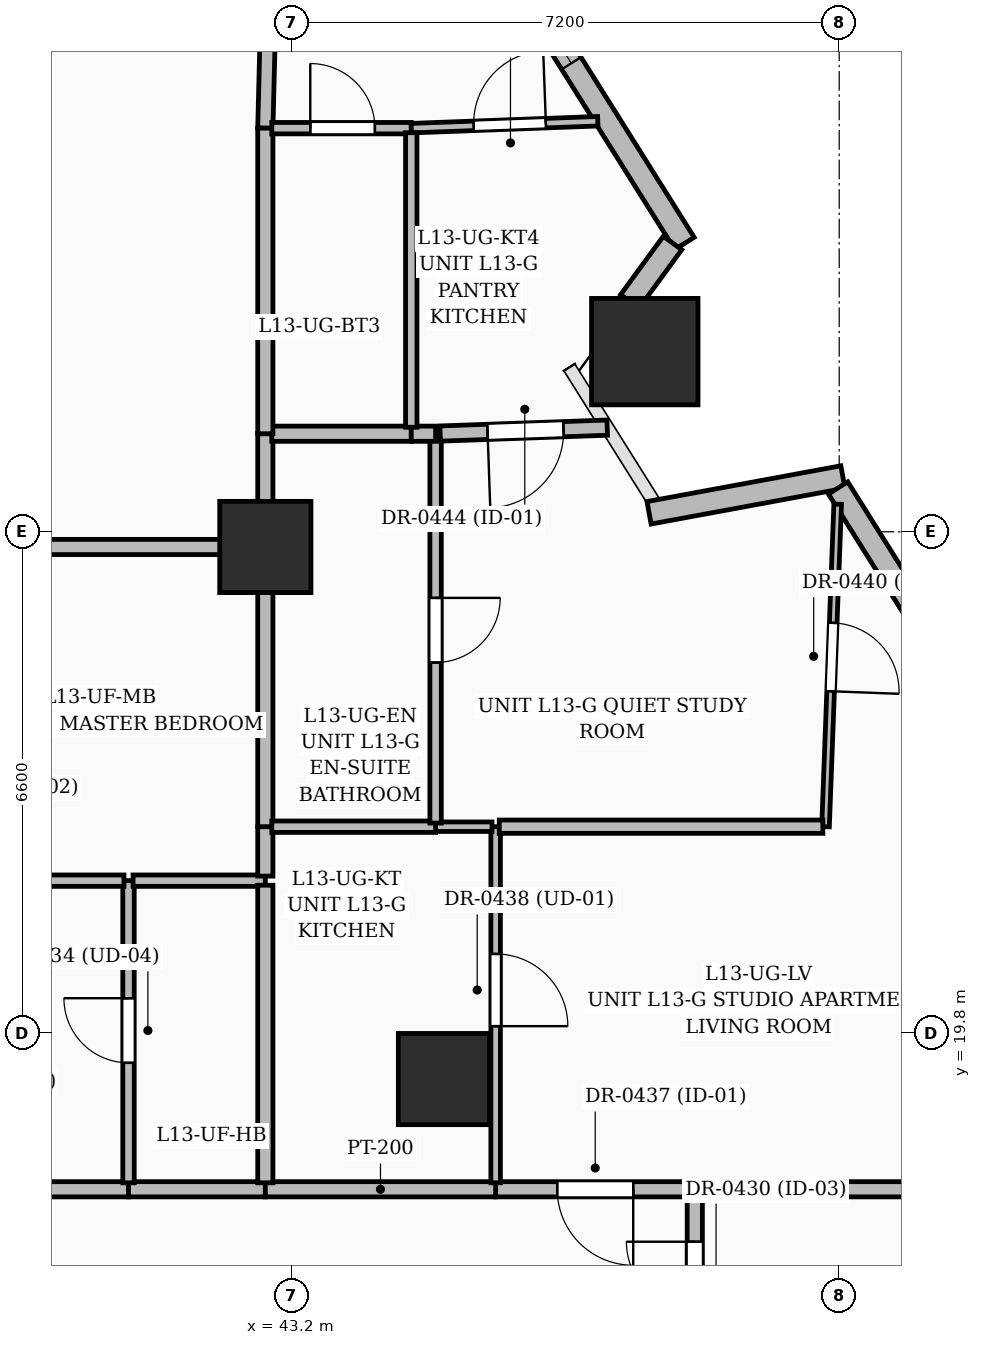
"""IFC4 building model, lengths in metres.
Left out: names, types, materials, properties, quantities, classifications, styles, units other than length and angle.
Written with IfcOpenShell. Run it as: python <this file> out.ifc"""

import sys

from ifc_helpers import new_model, si_unit, direction, frame, frame_2d, origin, origin_2d, place, context, subcontext, project, spatial, rectangle, extrude, element, fill, save


model = new_model("IFC4")
c1 = context("Model", 3, precision=1e-05, world=origin(), true_north=direction((0.0, 1.0)))
c2 = subcontext(c1, "Body", "Model", "MODEL_VIEW")
j1 = project(units=[si_unit("LENGTHUNIT", "METRE"), si_unit("PLANEANGLEUNIT", "RADIAN")], contexts=[c1])
p1 = place(None, origin())
s1 = spatial("IfcSite", under=j1, at=p1, CompositionType="ELEMENT")
p2 = place(p1, origin())
s2 = spatial("IfcBuilding", under=s1, at=p2, CompositionType="ELEMENT")
p3 = place(p2, frame((0.0, 0.0, 57.0)))
s3 = spatial("IfcBuildingStorey", under=s2, at=p3, CompositionType="ELEMENT", Elevation=57.0)
for number, where, z_axis, x_axis in (
    (1, (45.2, 19.2, 0.0), (0.0, 0.0, 1.0), (1.0, 0.0, 0.0)),
    (2, (42.85, 26.2, 0.0), (0.0, 0.0, 1.0), (1.0, 0.0, 0.0)),
):
    element("IfcColumn", number, at=place(p3, frame(where, z_axis=z_axis, x_axis=x_axis)), inside=s3, PredefinedType="COLUMN", context=c2, shape_type="SweptSolid", body=[
        extrude(rectangle(XDim=1.2, YDim=1.2, at=origin_2d()), origin(), (0.0, 0.0, 1.0), 3.6),
    ])
p4 = place(p3, frame((47.842, 28.77, 0.0), z_axis=(0.0, 0.0, 1.0), x_axis=(1.0, 0.0, 0.0)))
e3 = element("IfcColumn", 3, at=p4, inside=s3, PredefinedType="COLUMN", context=c2, shape_type="SweptSolid", body=[
    extrude(rectangle(XDim=1.4, YDim=1.4, at=origin_2d()), origin(), (0.0, 0.0, 1.0), 3.6),
])
p5 = place(p3, frame((45.24, 35.167, 0.0), z_axis=(0.0, 0.0, 1.0), x_axis=(0.53188806159, -0.846814672723, 0.0)))
e4 = element("IfcWall", 4, at=p5, inside=s3, PredefinedType="SOLIDWALL", context=c2, shape_type="SweptSolid", body=[
    extrude(rectangle(XDim=5.874, YDim=0.3, at=frame_2d((2.937, 0.0))), origin(), (0.0, 0.0, 1.0), 3.35),
])
p6 = place(p5, frame((0.975, 0.0, 0.55)))
e5 = element("IfcOpeningElement", 5, at=p6, cuts=e4, PredefinedType="OPENING", context=c2, shape_type="SweptSolid", body=[
    extrude(rectangle(XDim=2.1, YDim=2.4, at=frame_2d((1.05, 1.2))), frame((0.0, 0.16, 0.0), z_axis=(0.0, -1.0, 0.0), x_axis=(1.0, 0.0, 0.0)), (0.0, 0.0, 1.0), 0.32),
])
p7 = place(p3, frame((48.208, 30.199, 0.0), z_axis=(0.0, 0.0, 1.0), x_axis=(-0.590673165439, -0.806910906873, 0.0)))
e6 = element("IfcWall", 6, at=p7, inside=s3, PredefinedType="SOLIDWALL", context=c2, shape_type="SweptSolid", body=[
    extrude(rectangle(XDim=0.951, YDim=0.3, at=frame_2d((0.475, 0.0))), origin(), (0.0, 0.0, 1.0), 2.375),
])
p8 = place(p3, frame((47.898, 26.65, 0.0), z_axis=(0.0, 0.0, 1.0), x_axis=(0.983393554406, 0.181485859375, 0.0)))
e7 = element("IfcWall", 7, at=p8, inside=s3, PredefinedType="SOLIDWALL", context=c2, shape_type="SweptSolid", body=[
    extrude(rectangle(XDim=2.594, YDim=0.3, at=frame_2d((1.297, 0.0))), origin(), (0.0, 0.0, 1.0), 2.375),
])
p9 = place(p3, frame((50.385, 26.977, 0.0), z_axis=(0.0, 0.0, 1.0), x_axis=(0.531889110823, -0.846814013694, 0.0)))
e8 = element("IfcWall", 8, at=p9, inside=s3, PredefinedType="SOLIDWALL", context=c2, shape_type="SweptSolid", body=[
    extrude(rectangle(XDim=6.126, YDim=0.3, at=frame_2d((3.063, 0.0))), origin(), (0.0, 0.0, 1.0), 3.35),
])
p10 = place(p9, frame((2.37, 0.0, 0.6)))
e9 = element("IfcOpeningElement", 9, at=p10, cuts=e8, PredefinedType="OPENING", context=c2, shape_type="SweptSolid", body=[
    extrude(rectangle(XDim=1.5, YDim=2.1, at=frame_2d((0.75, 1.05))), frame((0.0, 0.16, 0.0), z_axis=(0.0, -1.0, 0.0), x_axis=(1.0, 0.0, 0.0)), (0.0, 0.0, 1.0), 0.32),
])
p11 = place(p3, frame((48.5, 15.47, 0.0), z_axis=(0.0, 0.0, 1.0), x_axis=(0.0, 1.0, 0.0)))
e10 = element("IfcWall", 10, at=p11, inside=s3, PredefinedType="PARTITIONING", context=c2, shape_type="SweptSolid", body=[
    extrude(rectangle(XDim=2.28, YDim=0.2, at=frame_2d((1.14, 0.0))), origin(), (0.0, 0.0, 1.0), 2.279),
])
p12 = place(p11, frame((0.69, 0.0, 0.0)))
e11 = element("IfcOpeningElement", 11, at=p12, cuts=e10, PredefinedType="OPENING", context=c2, shape_type="SweptSolid", body=[
    extrude(rectangle(XDim=0.9, YDim=2.1, at=frame_2d((0.45, 1.05))), frame((0.0, 0.11, 0.0), z_axis=(0.0, -1.0, 0.0), x_axis=(1.0, 0.0, 0.0)), (0.0, 0.0, 1.0), 0.22),
])
p13 = place(p3, frame((41.05, 17.75, 0.0), z_axis=(0.0, 0.0, 1.0), x_axis=(-1.0, 0.0, 0.0)))
e12 = element("IfcWall", 12, at=p13, inside=s3, PredefinedType="PARTITIONING", context=c2, shape_type="SweptSolid", body=[
    extrude(rectangle(XDim=5.48, YDim=0.2, at=frame_2d((2.74, 0.0))), origin(), (0.0, 0.0, 1.0), 3.35),
])
p14 = place(p13, frame((2.18, 0.0, 0.0)))
e13 = element("IfcOpeningElement", 13, at=p14, cuts=e12, PredefinedType="OPENING", context=c2, shape_type="SweptSolid", body=[
    extrude(rectangle(XDim=1.0, YDim=2.2, at=frame_2d((0.5, 1.1))), frame((0.0, 0.11, 0.0), z_axis=(0.0, -1.0, 0.0), x_axis=(1.0, 0.0, 0.0)), (0.0, 0.0, 1.0), 0.22),
])
p15 = place(p3, frame((42.85, 17.75, 0.0), z_axis=(0.0, 0.0, 1.0), x_axis=(-1.0, 0.0, 0.0)))
e14 = element("IfcWall", 14, at=p15, inside=s3, PredefinedType="PARTITIONING", context=c2, shape_type="SweptSolid", body=[
    extrude(rectangle(XDim=1.8, YDim=0.2, at=frame_2d((0.9, 0.0))), origin(), (0.0, 0.0, 1.0), 3.35),
])
p16 = place(p3, frame((48.415, 17.75, 0.0), z_axis=(0.0, 0.0, 1.0), x_axis=(-1.0, 0.0, 0.0)))
e15 = element("IfcWall", 15, at=p16, inside=s3, PredefinedType="PARTITIONING", context=c2, shape_type="SweptSolid", body=[
    extrude(rectangle(XDim=2.535, YDim=0.2, at=frame_2d((1.268, 0.0))), origin(), (0.0, 0.0, 1.0), 2.309),
])
p17 = place(p16, frame((0.725, 0.0, 0.0)))
e16 = element("IfcOpeningElement", 16, at=p17, cuts=e15, PredefinedType="OPENING", context=c2, shape_type="SweptSolid", body=[
    extrude(rectangle(XDim=1.0, YDim=2.2, at=frame_2d((0.5, 1.1))), frame((0.0, 0.11, 0.0), z_axis=(0.0, -1.0, 0.0), x_axis=(1.0, 0.0, 0.0)), (0.0, 0.0, 1.0), 0.22),
])
p18 = place(p3, frame((45.88, 17.75, 0.0), z_axis=(0.0, 0.0, 1.0), x_axis=(-1.0, 0.0, 0.0)))
e17 = element("IfcWall", 17, at=p18, inside=s3, PredefinedType="PARTITIONING", context=c2, shape_type="SweptSolid", body=[
    extrude(rectangle(XDim=3.03, YDim=0.2, at=frame_2d((1.515, 0.0))), origin(), (0.0, 0.0, 1.0), 2.309),
])
p19 = place(p3, frame((53.51, 17.75, 0.0), z_axis=(0.0, 0.0, 1.0), x_axis=(-1.0, 0.0, 0.0)))
e18 = element("IfcWall", 18, at=p19, inside=s3, PredefinedType="PARTITIONING", context=c2, shape_type="SweptSolid", body=[
    extrude(rectangle(XDim=4.925, YDim=0.2, at=frame_2d((2.462, 0.0))), origin(), (0.0, 0.0, 1.0), 2.279),
])
p20 = place(p3, frame((41.05, 17.835, 0.0), z_axis=(0.0, 0.0, 1.0), x_axis=(0.0, 1.0, 0.0)))
e19 = element("IfcWall", 19, at=p20, inside=s3, PredefinedType="PARTITIONING", context=c2, shape_type="SweptSolid", body=[
    extrude(rectangle(XDim=3.975, YDim=0.15, at=frame_2d((1.988, 0.0))), origin(), (0.0, 0.0, 1.0), 2.853),
])
p21 = place(p20, frame((1.579, 0.0, 0.0)))
e20 = element("IfcOpeningElement", 20, at=p21, cuts=e19, PredefinedType="OPENING", context=c2, shape_type="SweptSolid", body=[
    extrude(rectangle(XDim=0.85, YDim=2.1, at=frame_2d((0.425, 1.05))), frame((0.0, 0.085, 0.0), z_axis=(0.0, -1.0, 0.0), x_axis=(1.0, 0.0, 0.0)), (0.0, 0.0, 1.0), 0.17),
])
p22 = place(p3, frame((40.99, 21.81, 0.0), z_axis=(0.0, 0.0, 1.0), x_axis=(-1.0, 0.0, 0.0)))
e21 = element("IfcWall", 21, at=p22, inside=s3, PredefinedType="PARTITIONING", context=c2, shape_type="SweptSolid", body=[
    extrude(rectangle(XDim=5.373, YDim=0.15, at=frame_2d((2.686, 0.0))), origin(), (0.0, 0.0, 1.0), 3.35),
])
p23 = place(p22, frame((2.23, 0.0, 0.0)))
e22 = element("IfcOpeningElement", 22, at=p23, cuts=e21, PredefinedType="OPENING", context=c2, shape_type="SweptSolid", body=[
    extrude(rectangle(XDim=0.9, YDim=2.15, at=frame_2d((0.45, 1.075))), frame((0.0, 0.085, 0.0), z_axis=(0.0, -1.0, 0.0), x_axis=(1.0, 0.0, 0.0)), (0.0, 0.0, 1.0), 0.17),
])
p24 = place(p3, frame((42.85, 21.81, 0.0), z_axis=(0.0, 0.0, 1.0), x_axis=(-1.0, 0.0, 0.0)))
e23 = element("IfcWall", 23, at=p24, inside=s3, PredefinedType="PARTITIONING", context=c2, shape_type="SweptSolid", body=[
    extrude(rectangle(XDim=1.74, YDim=0.15, at=frame_2d((0.87, 0.0))), origin(), (0.0, 0.0, 1.0), 3.35),
])
p25 = place(p3, frame((42.85, 17.835, 0.0), z_axis=(0.0, 0.0, 1.0), x_axis=(0.0, 1.0, 0.0)))
e24 = element("IfcWall", 24, at=p25, inside=s3, PredefinedType="PARTITIONING", context=c2, shape_type="SweptSolid", body=[
    extrude(rectangle(XDim=3.915, YDim=0.2, at=frame_2d((1.958, 0.0))), origin(), (0.0, 0.0, 1.0), 2.853),
])
p26 = place(p3, frame((42.85, 21.87, 0.0), z_axis=(0.0, 0.0, 1.0), x_axis=(0.0, 1.0, 0.0)))
e25 = element("IfcWall", 25, at=p26, inside=s3, PredefinedType="PARTITIONING", context=c2, shape_type="SweptSolid", body=[
    extrude(rectangle(XDim=0.65, YDim=0.2, at=frame_2d((0.325, 0.0))), origin(), (0.0, 0.0, 1.0), 3.35),
])
p27 = place(p3, frame((42.85, 22.52, 0.0), z_axis=(0.0, 0.0, 1.0), x_axis=(0.0, 1.0, 0.0)))
e26 = element("IfcWall", 26, at=p27, inside=s3, PredefinedType="PARTITIONING", context=c2, shape_type="SweptSolid", body=[
    extrude(rectangle(XDim=3.68, YDim=0.2, at=frame_2d((1.84, 0.0))), origin(), (0.0, 0.0, 1.0), 2.309),
])
p28 = place(p3, frame((42.765, 26.2, 0.0), z_axis=(0.0, 0.0, 1.0), x_axis=(-1.0, 0.0, 0.0)))
e27 = element("IfcWall", 27, at=p28, inside=s3, PredefinedType="PARTITIONING", context=c2, shape_type="SweptSolid", body=[
    extrude(rectangle(XDim=7.105, YDim=0.2, at=frame_2d((3.552, 0.0))), origin(), (0.0, 0.0, 1.0), 2.309),
])
p29 = place(p3, frame((45.88, 22.52, 0.0), z_axis=(0.0, 0.0, 1.0), x_axis=(0.0, -1.0, 0.0)))
e28 = element("IfcWall", 28, at=p29, inside=s3, PredefinedType="PARTITIONING", context=c2, shape_type="SweptSolid", body=[
    extrude(rectangle(XDim=4.685, YDim=0.125, at=frame_2d((2.343, 0.0))), origin(), (0.0, 0.0, 1.0), 2.279),
])
p30 = place(p29, frame((1.674, 0.0, 0.0)))
e29 = element("IfcOpeningElement", 29, at=p30, cuts=e28, PredefinedType="OPENING", context=c2, shape_type="SweptSolid", body=[
    extrude(rectangle(XDim=0.95, YDim=2.2, at=frame_2d((0.475, 1.1))), frame((0.0, 0.072, 0.0), z_axis=(0.0, -1.0, 0.0), x_axis=(1.0, 0.0, 0.0)), (0.0, 0.0, 1.0), 0.145),
])
p31 = place(p3, frame((50.38, 26.763, 0.0), z_axis=(0.0, 0.0, 1.0), x_axis=(-0.037662425344, -0.999290519177, 0.0)))
e30 = element("IfcWall", 30, at=p31, inside=s3, PredefinedType="PARTITIONING", context=c2, shape_type="SweptSolid", body=[
    extrude(rectangle(XDim=4.246, YDim=0.1, at=frame_2d((2.123, 0.0))), origin(), (0.0, 0.0, 1.0), 2.37),
])
p32 = place(p31, frame((1.562, 0.0, 0.0)))
e31 = element("IfcOpeningElement", 31, at=p32, cuts=e30, PredefinedType="OPENING", context=c2, shape_type="SweptSolid", body=[
    extrude(rectangle(XDim=0.9, YDim=2.15, at=frame_2d((0.45, 1.075))), frame((0.0, 0.06, 0.0), z_axis=(0.0, -1.0, 0.0), x_axis=(1.0, 0.0, 0.0)), (0.0, 0.0, 1.0), 0.12),
])
p33 = place(p3, frame((50.185, 22.52, 0.0), z_axis=(0.0, 0.0, 1.0), x_axis=(-1.0, 0.0, 0.0)))
e32 = element("IfcWall", 32, at=p33, inside=s3, PredefinedType="PARTITIONING", context=c2, shape_type="SweptSolid", body=[
    extrude(rectangle(XDim=4.258, YDim=0.175, at=frame_2d((2.129, 0.0))), origin(), (0.0, 0.0, 1.0), 2.279),
])
p34 = place(p3, frame((45.833, 22.52, 0.0), z_axis=(0.0, 0.0, 1.0), x_axis=(-1.0, 0.0, 0.0)))
e33 = element("IfcWall", 33, at=p34, inside=s3, PredefinedType="PARTITIONING", context=c2, shape_type="SweptSolid", body=[
    extrude(rectangle(XDim=0.742, YDim=0.125, at=frame_2d((0.371, 0.0))), origin(), (0.0, 0.0, 1.0), 3.35),
])
p35 = place(p3, frame((45.09, 22.52, 0.0), z_axis=(0.0, 0.0, 1.0), x_axis=(-1.0, 0.0, 0.0)))
e34 = element("IfcWall", 34, at=p35, inside=s3, PredefinedType="PARTITIONING", context=c2, shape_type="SweptSolid", body=[
    extrude(rectangle(XDim=2.155, YDim=0.15, at=frame_2d((1.078, 0.0))), origin(), (0.0, 0.0, 1.0), 2.309),
])
p36 = place(p3, frame((45.09, 27.69, 0.0), z_axis=(0.0, 0.0, 1.0), x_axis=(0.0, -1.0, 0.0)))
e35 = element("IfcWall", 35, at=p36, inside=s3, PredefinedType="PARTITIONING", context=c2, shape_type="SweptSolid", body=[
    extrude(rectangle(XDim=5.123, YDim=0.15, at=frame_2d((2.561, 0.0))), origin(), (0.0, 0.0, 1.0), 2.709),
])
p37 = place(p36, frame((2.16, 0.0, 0.0)))
e36 = element("IfcOpeningElement", 36, at=p37, cuts=e35, PredefinedType="OPENING", context=c2, shape_type="SweptSolid", body=[
    extrude(rectangle(XDim=0.85, YDim=2.1, at=frame_2d((0.425, 1.05))), frame((0.0, 0.085, 0.0), z_axis=(0.0, -1.0, 0.0), x_axis=(1.0, 0.0, 0.0)), (0.0, 0.0, 1.0), 0.17),
])
p38 = place(p3, frame((47.348, 27.77, 0.0), z_axis=(0.0, 0.0, 1.0), x_axis=(-0.9993728547, -0.035410412157, 0.0)))
e37 = element("IfcWall", 37, at=p38, inside=s3, PredefinedType="PARTITIONING", context=c2, shape_type="SweptSolid", body=[
    extrude(rectangle(XDim=2.199, YDim=0.2, at=frame_2d((1.1, 0.0))), origin(), (0.0, 0.0, 1.0), 2.279),
])
p39 = place(p38, frame((0.575, 0.0, 0.0)))
e38 = element("IfcOpeningElement", 38, at=p39, cuts=e37, PredefinedType="OPENING", context=c2, shape_type="SweptSolid", body=[
    extrude(rectangle(XDim=1.0, YDim=2.2, at=frame_2d((0.5, 1.1))), frame((0.0, 0.11, 0.0), z_axis=(0.0, -1.0, 0.0), x_axis=(1.0, 0.0, 0.0)), (0.0, 0.0, 1.0), 0.22),
])
p40 = place(p3, frame((42.85, 27.69, 0.0), z_axis=(0.0, 0.0, 1.0), x_axis=(0.0, -1.0, 0.0)))
e39 = element("IfcWall", 39, at=p40, inside=s3, PredefinedType="PARTITIONING", context=c2, shape_type="SweptSolid", body=[
    extrude(rectangle(XDim=1.49, YDim=0.2, at=frame_2d((0.745, 0.0))), origin(), (0.0, 0.0, 1.0), 2.279),
])
p41 = place(p3, frame((44.77, 27.69, 0.0), z_axis=(0.0, 0.0, 1.0), x_axis=(-1.0, 0.0, 0.0)))
e40 = element("IfcWall", 40, at=p41, inside=s3, PredefinedType="PARTITIONING", context=c2, shape_type="SweptSolid", body=[
    extrude(rectangle(XDim=1.835, YDim=0.2, at=frame_2d((0.917, 0.0))), origin(), (0.0, 0.0, 1.0), 2.279),
])
p42 = place(p3, frame((45.09, 27.69, 0.0), z_axis=(0.0, 0.0, 1.0), x_axis=(-1.0, 0.0, 0.0)))
e41 = element("IfcWall", 41, at=p42, inside=s3, PredefinedType="PARTITIONING", context=c2, shape_type="SweptSolid", body=[
    extrude(rectangle(XDim=0.32, YDim=0.2, at=frame_2d((0.16, 0.0))), origin(), (0.0, 0.0, 1.0), 3.35),
])
p43 = place(p3, frame((42.85, 31.71, 0.0), z_axis=(0.0, 0.0, 1.0), x_axis=(0.025129190117, 0.999684212041, 0.0)))
e42 = element("IfcWall", 42, at=p43, inside=s3, PredefinedType="PARTITIONING", context=c2, shape_type="SweptSolid", body=[
    extrude(rectangle(XDim=6.723, YDim=0.2, at=frame_2d((3.362, 0.0))), origin(), (0.0, 0.0, 1.0), 2.37),
])
p44 = place(p3, frame((42.85, 27.69, 0.0), z_axis=(0.0, 0.0, 1.0), x_axis=(0.0, 1.0, 0.0)))
e43 = element("IfcWall", 43, at=p44, inside=s3, PredefinedType="PARTITIONING", context=c2, shape_type="SweptSolid", body=[
    extrude(rectangle(XDim=4.02, YDim=0.2, at=frame_2d((2.01, 0.0))), origin(), (0.0, 0.0, 1.0), 2.279),
])
p45 = place(p3, frame((42.935, 31.71, 0.0), z_axis=(0.0, 0.0, 1.0), x_axis=(1.0, 0.0, 0.0)))
e44 = element("IfcWall", 44, at=p45, inside=s3, PredefinedType="PARTITIONING", context=c2, shape_type="SweptSolid", body=[
    extrude(rectangle(XDim=1.835, YDim=0.15, at=frame_2d((0.917, 0.0))), origin(), (0.0, 0.0, 1.0), 3.35),
])
p46 = place(p45, frame((0.506, 0.0, 0.0)))
e45 = element("IfcOpeningElement", 45, at=p46, cuts=e44, PredefinedType="OPENING", context=c2, shape_type="SweptSolid", body=[
    extrude(rectangle(XDim=0.85, YDim=2.1, at=frame_2d((0.425, 1.05))), frame((0.0, 0.085, 0.0), z_axis=(0.0, -1.0, 0.0), x_axis=(1.0, 0.0, 0.0)), (0.0, 0.0, 1.0), 0.17),
])
p47 = place(p3, frame((44.77, 31.71, 0.0), z_axis=(0.0, 0.0, 1.0), x_axis=(0.99931224383, 0.037081522776, 0.0)))
e46 = element("IfcWall", 46, at=p47, inside=s3, PredefinedType="PARTITIONING", context=c2, shape_type="SweptSolid", body=[
    extrude(rectangle(XDim=2.456, YDim=0.125, at=frame_2d((1.228, 0.0))), origin(), (0.0, 0.0, 1.0), 2.37),
])
p48 = place(p47, frame((0.822, 0.0, 0.0)))
e47 = element("IfcOpeningElement", 47, at=p48, cuts=e46, PredefinedType="OPENING", context=c2, shape_type="SweptSolid", body=[
    extrude(rectangle(XDim=0.95, YDim=2.2, at=frame_2d((0.475, 1.1))), frame((0.0, 0.072, 0.0), z_axis=(0.0, -1.0, 0.0), x_axis=(1.0, 0.0, 0.0)), (0.0, 0.0, 1.0), 0.145),
])
p49 = place(p3, frame((44.77, 27.775, 0.0), z_axis=(0.0, 0.0, 1.0), x_axis=(0.0, 1.0, 0.0)))
e48 = element("IfcWall", 48, at=p49, inside=s3, PredefinedType="PARTITIONING", context=c2, shape_type="SweptSolid", body=[
    extrude(rectangle(XDim=3.875, YDim=0.15, at=frame_2d((1.938, 0.0))), origin(), (0.0, 0.0, 1.0), 3.35),
])
p50 = place(p6, origin())
e49 = element("IfcWindow", 49, at=p50, inside=s3, PartitioningType="SINGLE_PANEL", PredefinedType="WINDOW", context=c2, shape_type="SweptSolid", body=[
    extrude(rectangle(XDim=2.1, YDim=2.4, at=frame_2d((1.05, 1.2))), frame((0.0, 0.03, 0.0), z_axis=(0.0, -1.0, 0.0), x_axis=(1.0, 0.0, 0.0)), (0.0, 0.0, 1.0), 0.06),
])
fill(e5, e49)
p51 = place(p12, origin())
e50 = element("IfcDoor", 50, at=p51, inside=s3, OperationType="SINGLE_SWING_RIGHT", PredefinedType="DOOR", context=c2, shape_type="SweptSolid", body=[
    extrude(rectangle(XDim=0.9, YDim=2.1, at=frame_2d((0.45, 1.05))), frame((0.0, 0.025, 0.0), z_axis=(0.0, -1.0, 0.0), x_axis=(1.0, 0.0, 0.0)), (0.0, 0.0, 1.0), 0.05),
])
fill(e11, e50)
p52 = place(p21, origin())
e51 = element("IfcDoor", 51, at=p52, inside=s3, OperationType="SINGLE_SWING_RIGHT", PredefinedType="DOOR", context=c2, shape_type="SweptSolid", body=[
    extrude(rectangle(XDim=0.85, YDim=2.1, at=frame_2d((0.425, 1.05))), frame((0.0, 0.025, 0.0), z_axis=(0.0, -1.0, 0.0), x_axis=(1.0, 0.0, 0.0)), (0.0, 0.0, 1.0), 0.05),
])
fill(e20, e51)
p53 = place(p17, origin())
e52 = element("IfcDoor", 52, at=p53, inside=s3, OperationType="SINGLE_SWING_LEFT", PredefinedType="DOOR", context=c2, shape_type="SweptSolid", body=[
    extrude(rectangle(XDim=1.0, YDim=2.2, at=frame_2d((0.5, 1.1))), frame((0.0, 0.025, 0.0), z_axis=(0.0, -1.0, 0.0), x_axis=(1.0, 0.0, 0.0)), (0.0, 0.0, 1.0), 0.05),
])
fill(e16, e52)
p54 = place(p30, origin())
e53 = element("IfcDoor", 53, at=p54, inside=s3, OperationType="SINGLE_SWING_RIGHT", PredefinedType="DOOR", context=c2, shape_type="SweptSolid", body=[
    extrude(rectangle(XDim=0.95, YDim=2.2, at=frame_2d((0.475, 1.1))), frame((0.0, 0.025, 0.0), z_axis=(0.0, -1.0, 0.0), x_axis=(1.0, 0.0, 0.0)), (0.0, 0.0, 1.0), 0.05),
])
fill(e29, e53)
p55 = place(p32, origin())
e54 = element("IfcDoor", 54, at=p55, inside=s3, OperationType="SINGLE_SWING_RIGHT", PredefinedType="DOOR", context=c2, shape_type="SweptSolid", body=[
    extrude(rectangle(XDim=0.9, YDim=2.15, at=frame_2d((0.45, 1.075))), frame((0.0, 0.025, 0.0), z_axis=(0.0, -1.0, 0.0), x_axis=(1.0, 0.0, 0.0)), (0.0, 0.0, 1.0), 0.05),
])
fill(e31, e54)
p56 = place(p37, origin())
e55 = element("IfcDoor", 55, at=p56, inside=s3, OperationType="SINGLE_SWING_LEFT", PredefinedType="DOOR", context=c2, shape_type="SweptSolid", body=[
    extrude(rectangle(XDim=0.85, YDim=2.1, at=frame_2d((0.425, 1.05))), frame((0.0, 0.025, 0.0), z_axis=(0.0, -1.0, 0.0), x_axis=(1.0, 0.0, 0.0)), (0.0, 0.0, 1.0), 0.05),
])
fill(e36, e55)
p57 = place(p48, origin())
e56 = element("IfcDoor", 56, at=p57, inside=s3, OperationType="SINGLE_SWING_RIGHT", PredefinedType="DOOR", context=c2, shape_type="SweptSolid", body=[
    extrude(rectangle(XDim=0.95, YDim=2.2, at=frame_2d((0.475, 1.1))), frame((0.0, 0.025, 0.0), z_axis=(0.0, -1.0, 0.0), x_axis=(1.0, 0.0, 0.0)), (0.0, 0.0, 1.0), 0.05),
])
fill(e47, e56)
p58 = place(p46, origin())
e57 = element("IfcDoor", 57, at=p58, inside=s3, OperationType="SINGLE_SWING_LEFT", PredefinedType="DOOR", context=c2, shape_type="SweptSolid", body=[
    extrude(rectangle(XDim=0.85, YDim=2.1, at=frame_2d((0.425, 1.05))), frame((0.0, 0.025, 0.0), z_axis=(0.0, -1.0, 0.0), x_axis=(1.0, 0.0, 0.0)), (0.0, 0.0, 1.0), 0.05),
])
fill(e45, e57)
p59 = place(p39, origin())
e58 = element("IfcDoor", 58, at=p59, inside=s3, OperationType="SINGLE_SWING_RIGHT", PredefinedType="DOOR", context=c2, shape_type="SweptSolid", body=[
    extrude(rectangle(XDim=1.0, YDim=2.2, at=frame_2d((0.5, 1.1))), frame((0.0, 0.025, 0.0), z_axis=(0.0, -1.0, 0.0), x_axis=(1.0, 0.0, 0.0)), (0.0, 0.0, 1.0), 0.05),
])
fill(e38, e58)
save(model, sys.argv[1])
